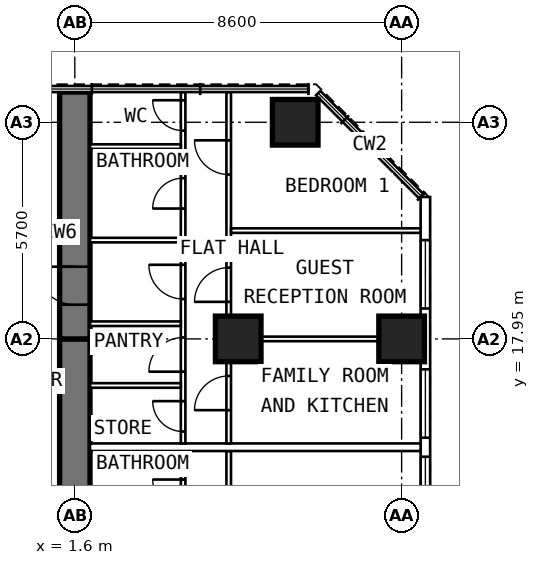
"""IFC4 building model, lengths in metres.
Left out: names, types, materials, properties, quantities, classifications, styles, units other than length and angle.
Written with IfcOpenShell. Run it as: python <this file> out.ifc"""

import sys

from ifc_helpers import new_model, si_unit, direction, frame, frame_2d, origin, origin_2d, place, context, subcontext, project, spatial, rectangle, extrude, element, fill, save


model = new_model("IFC4")
c1 = context("Model", 3, precision=1e-05, world=origin(), true_north=direction((0.0, 1.0)))
c2 = subcontext(c1, "Body", "Model", "MODEL_VIEW")
j1 = project(units=[si_unit("LENGTHUNIT", "METRE"), si_unit("PLANEANGLEUNIT", "RADIAN")], contexts=[c1])
p1 = place(None, origin())
s1 = spatial("IfcSite", under=j1, at=p1, CompositionType="ELEMENT")
p2 = place(p1, origin())
s2 = spatial("IfcBuilding", under=s1, at=p2, CompositionType="ELEMENT")
p3 = place(p2, frame((0.0, 0.0, 127.4)))
s3 = spatial("IfcBuildingStorey", under=s2, at=p3, CompositionType="ELEMENT", Elevation=127.4)
for number, where, z_axis, x_axis in (
    (1, (10.2, 17.95, 0.0), (0.0, 0.0, 1.0), (0.0, 1.0, 0.0)),
    (2, (7.4, 23.65, 0.0), (0.0, 0.0, 1.0), (0.0, 1.0, 0.0)),
    (3, (5.9, 17.95, 0.0), (0.0, 0.0, 1.0), (0.0, 1.0, 0.0)),
):
    element("IfcColumn", number, at=place(p3, frame(where, z_axis=z_axis, x_axis=x_axis)), inside=s3, PredefinedType="COLUMN", context=c2, shape_type="SweptSolid", body=[
        extrude(rectangle(XDim=1.2, YDim=1.2, at=origin_2d()), origin(), (0.0, 0.0, 1.0), 3.6),
    ])
p4 = place(p3, frame((1.6, 9.6, 0.0), z_axis=(0.0, 0.0, 1.0), x_axis=(0.0, 1.0, 0.0)))
e4 = element("IfcWall", 4, at=p4, inside=s3, PredefinedType="SHEAR", context=c2, shape_type="SweptSolid", body=[
    extrude(rectangle(XDim=8.35, YDim=0.8, at=frame_2d((4.175, 0.0))), origin(), (0.0, 0.0, 1.0), 3.6),
])
p5 = place(p4, frame((1.3, 0.0, 0.0)))
e5 = element("IfcOpeningElement", 5, at=p5, cuts=e4, PredefinedType="OPENING", context=c2, shape_type="SweptSolid", body=[
    extrude(rectangle(XDim=1.0, YDim=2.1, at=frame_2d((0.5, 1.05))), frame((0.0, 0.412, 0.0), z_axis=(0.0, -1.0, 0.0), x_axis=(1.0, 0.0, 0.0)), (0.0, 0.0, 1.0), 0.824),
])
p6 = place(p3, frame((1.6, 17.95, 0.0), z_axis=(0.0, 0.0, 1.0), x_axis=(0.0, 1.0, 0.0)))
e6 = element("IfcWall", 6, at=p6, inside=s3, PredefinedType="SHEAR", context=c2, shape_type="SweptSolid", body=[
    extrude(rectangle(XDim=6.495, YDim=0.8, at=frame_2d((3.248, 0.0))), origin(), (0.0, 0.0, 1.0), 3.6),
])
p7 = place(p6, frame((0.9, 0.0, 0.0)))
e7 = element("IfcOpeningElement", 7, at=p7, cuts=e6, PredefinedType="OPENING", context=c2, shape_type="SweptSolid", body=[
    extrude(rectangle(XDim=1.0, YDim=2.1, at=frame_2d((0.5, 1.05))), frame((0.0, 0.412, 0.0), z_axis=(0.0, -1.0, 0.0), x_axis=(1.0, 0.0, 0.0)), (0.0, 0.0, 1.0), 0.824),
])
p8 = place(p3, frame((10.825, 6.409, 0.0), z_axis=(0.0, 0.0, 1.0), x_axis=(0.0, 1.0, 0.0)))
e8 = element("IfcWall", 8, at=p8, inside=s3, PredefinedType="SOLIDWALL", context=c2, shape_type="SweptSolid", body=[
    extrude(rectangle(XDim=15.276, YDim=0.25, at=frame_2d((7.638, 0.0))), origin(), (0.0, 0.0, 1.0), 3.35),
])
p9 = place(p8, frame((0.941, 0.0, 0.8)))
e9 = element("IfcOpeningElement", 9, at=p9, cuts=e8, PredefinedType="OPENING", context=c2, shape_type="SweptSolid", body=[
    extrude(rectangle(XDim=1.8, YDim=1.8, at=frame_2d((0.9, 0.9))), frame((0.0, 0.137, 0.0), z_axis=(0.0, -1.0, 0.0), x_axis=(1.0, 0.0, 0.0)), (0.0, 0.0, 1.0), 0.274),
])
p10 = place(p8, frame((3.241, 0.0, 0.8)))
e10 = element("IfcOpeningElement", 10, at=p10, cuts=e8, PredefinedType="OPENING", context=c2, shape_type="SweptSolid", body=[
    extrude(rectangle(XDim=1.8, YDim=1.8, at=frame_2d((0.9, 0.9))), frame((0.0, 0.137, 0.0), z_axis=(0.0, -1.0, 0.0), x_axis=(1.0, 0.0, 0.0)), (0.0, 0.0, 1.0), 0.274),
])
p11 = place(p8, frame((6.641, 0.0, 0.8)))
e11 = element("IfcOpeningElement", 11, at=p11, cuts=e8, PredefinedType="OPENING", context=c2, shape_type="SweptSolid", body=[
    extrude(rectangle(XDim=1.8, YDim=1.8, at=frame_2d((0.9, 0.9))), frame((0.0, 0.137, 0.0), z_axis=(0.0, -1.0, 0.0), x_axis=(1.0, 0.0, 0.0)), (0.0, 0.0, 1.0), 0.274),
])
p12 = place(p8, frame((8.941, 0.0, 0.8)))
e12 = element("IfcOpeningElement", 12, at=p12, cuts=e8, PredefinedType="OPENING", context=c2, shape_type="SweptSolid", body=[
    extrude(rectangle(XDim=1.8, YDim=1.8, at=frame_2d((0.9, 0.9))), frame((0.0, 0.137, 0.0), z_axis=(0.0, -1.0, 0.0), x_axis=(1.0, 0.0, 0.0)), (0.0, 0.0, 1.0), 0.274),
])
p13 = place(p8, frame((12.341, 0.0, 0.8)))
e13 = element("IfcOpeningElement", 13, at=p13, cuts=e8, PredefinedType="OPENING", context=c2, shape_type="SweptSolid", body=[
    extrude(rectangle(XDim=1.8, YDim=1.8, at=frame_2d((0.9, 0.9))), frame((0.0, 0.137, 0.0), z_axis=(0.0, -1.0, 0.0), x_axis=(1.0, 0.0, 0.0)), (0.0, 0.0, 1.0), 0.274),
])
p14 = place(p3, frame((4.45, 10.05, 0.0), z_axis=(0.0, 0.0, 1.0), x_axis=(0.0, 1.0, 0.0)))
e14 = element("IfcWall", 14, at=p14, inside=s3, PredefinedType="PARTITIONING", context=c2, shape_type="SweptSolid", body=[
    extrude(rectangle(XDim=4.95, YDim=0.12, at=frame_2d((2.475, 0.0))), origin(), (0.0, 0.0, 1.0), 3.35),
])
p15 = place(p14, frame((0.8, 0.0, 0.0)))
e15 = element("IfcOpeningElement", 15, at=p15, cuts=e14, PredefinedType="OPENING", context=c2, shape_type="SweptSolid", body=[
    extrude(rectangle(XDim=0.9, YDim=2.1, at=frame_2d((0.45, 1.05))), frame((0.0, 0.072, 0.0), z_axis=(0.0, -1.0, 0.0), x_axis=(1.0, 0.0, 0.0)), (0.0, 0.0, 1.0), 0.144),
])
p16 = place(p14, frame((3.4, 0.0, 0.0)))
e16 = element("IfcOpeningElement", 16, at=p16, cuts=e14, PredefinedType="OPENING", context=c2, shape_type="SweptSolid", body=[
    extrude(rectangle(XDim=0.8, YDim=2.1, at=frame_2d((0.4, 1.05))), frame((0.0, 0.072, 0.0), z_axis=(0.0, -1.0, 0.0), x_axis=(1.0, 0.0, 0.0)), (0.0, 0.0, 1.0), 0.144),
])
p17 = place(p3, frame((5.65, 9.6, 0.0), z_axis=(0.0, 0.0, 1.0), x_axis=(0.0, 1.0, 0.0)))
e17 = element("IfcWall", 17, at=p17, inside=s3, PredefinedType="PARTITIONING", context=c2, shape_type="SweptSolid", body=[
    extrude(rectangle(XDim=5.4, YDim=0.12, at=frame_2d((2.7, 0.0))), origin(), (0.0, 0.0, 1.0), 3.35),
])
p18 = place(p17, frame((3.4, 0.0, 0.0)))
e18 = element("IfcOpeningElement", 18, at=p18, cuts=e17, PredefinedType="OPENING", context=c2, shape_type="SweptSolid", body=[
    extrude(rectangle(XDim=0.9, YDim=2.1, at=frame_2d((0.45, 1.05))), frame((0.0, 0.072, 0.0), z_axis=(0.0, -1.0, 0.0), x_axis=(1.0, 0.0, 0.0)), (0.0, 0.0, 1.0), 0.144),
])
p19 = place(p3, frame((4.45, 15.2, 0.0), z_axis=(0.0, 0.0, 1.0), x_axis=(0.0, 1.0, 0.0)))
e19 = element("IfcWall", 19, at=p19, inside=s3, PredefinedType="PARTITIONING", context=c2, shape_type="SweptSolid", body=[
    extrude(rectangle(XDim=9.245, YDim=0.12, at=frame_2d((4.623, 0.0))), origin(), (0.0, 0.0, 1.0), 3.35),
])
p20 = place(p19, frame((0.312, 0.0, 0.0)))
e20 = element("IfcOpeningElement", 20, at=p20, cuts=e19, PredefinedType="OPENING", context=c2, shape_type="SweptSolid", body=[
    extrude(rectangle(XDim=0.8, YDim=2.1, at=frame_2d((0.4, 1.05))), frame((0.0, 0.072, 0.0), z_axis=(0.0, -1.0, 0.0), x_axis=(1.0, 0.0, 0.0)), (0.0, 0.0, 1.0), 0.144),
])
p21 = place(p19, frame((1.887, 0.0, 0.0)))
e21 = element("IfcOpeningElement", 21, at=p21, cuts=e19, PredefinedType="OPENING", context=c2, shape_type="SweptSolid", body=[
    extrude(rectangle(XDim=0.9, YDim=2.1, at=frame_2d((0.45, 1.05))), frame((0.0, 0.072, 0.0), z_axis=(0.0, -1.0, 0.0), x_axis=(1.0, 0.0, 0.0)), (0.0, 0.0, 1.0), 0.144),
])
p22 = place(p19, frame((3.8, 0.0, 0.0)))
e22 = element("IfcOpeningElement", 22, at=p22, cuts=e19, PredefinedType="OPENING", context=c2, shape_type="SweptSolid", body=[
    extrude(rectangle(XDim=0.9, YDim=2.1, at=frame_2d((0.45, 1.05))), frame((0.0, 0.072, 0.0), z_axis=(0.0, -1.0, 0.0), x_axis=(1.0, 0.0, 0.0)), (0.0, 0.0, 1.0), 0.144),
])
p23 = place(p19, frame((6.18, 0.0, 0.0)))
e23 = element("IfcOpeningElement", 23, at=p23, cuts=e19, PredefinedType="OPENING", context=c2, shape_type="SweptSolid", body=[
    extrude(rectangle(XDim=0.8, YDim=2.1, at=frame_2d((0.4, 1.05))), frame((0.0, 0.072, 0.0), z_axis=(0.0, -1.0, 0.0), x_axis=(1.0, 0.0, 0.0)), (0.0, 0.0, 1.0), 0.144),
])
p24 = place(p19, frame((8.23, 0.0, 0.0)))
e24 = element("IfcOpeningElement", 24, at=p24, cuts=e19, PredefinedType="OPENING", context=c2, shape_type="SweptSolid", body=[
    extrude(rectangle(XDim=0.8, YDim=2.1, at=frame_2d((0.4, 1.05))), frame((0.0, 0.072, 0.0), z_axis=(0.0, -1.0, 0.0), x_axis=(1.0, 0.0, 0.0)), (0.0, 0.0, 1.0), 0.144),
])
p25 = place(p3, frame((5.65, 15.2, 0.0), z_axis=(0.0, 0.0, 1.0), x_axis=(0.0, 1.0, 0.0)))
e25 = element("IfcWall", 25, at=p25, inside=s3, PredefinedType="PARTITIONING", context=c2, shape_type="SweptSolid", body=[
    extrude(rectangle(XDim=9.245, YDim=0.12, at=frame_2d((4.623, 0.0))), origin(), (0.0, 0.0, 1.0), 3.35),
])
p26 = place(p25, frame((0.875, 0.0, 0.0)))
e26 = element("IfcOpeningElement", 26, at=p26, cuts=e25, PredefinedType="OPENING", context=c2, shape_type="SweptSolid", body=[
    extrude(rectangle(XDim=0.9, YDim=2.1, at=frame_2d((0.45, 1.05))), frame((0.0, 0.072, 0.0), z_axis=(0.0, -1.0, 0.0), x_axis=(1.0, 0.0, 0.0)), (0.0, 0.0, 1.0), 0.144),
])
p27 = place(p25, frame((3.725, 0.0, 0.0)))
e27 = element("IfcOpeningElement", 27, at=p27, cuts=e25, PredefinedType="OPENING", context=c2, shape_type="SweptSolid", body=[
    extrude(rectangle(XDim=0.9, YDim=2.1, at=frame_2d((0.45, 1.05))), frame((0.0, 0.072, 0.0), z_axis=(0.0, -1.0, 0.0), x_axis=(1.0, 0.0, 0.0)), (0.0, 0.0, 1.0), 0.144),
])
p28 = place(p25, frame((7.075, 0.0, 0.0)))
e28 = element("IfcOpeningElement", 28, at=p28, cuts=e25, PredefinedType="OPENING", context=c2, shape_type="SweptSolid", body=[
    extrude(rectangle(XDim=0.9, YDim=2.1, at=frame_2d((0.45, 1.05))), frame((0.0, 0.072, 0.0), z_axis=(0.0, -1.0, 0.0), x_axis=(1.0, 0.0, 0.0)), (0.0, 0.0, 1.0), 0.144),
])
p29 = place(p3, frame((5.71, 17.95, 0.0), z_axis=(0.0, 0.0, 1.0), x_axis=(1.0, 0.0, 0.0)))
e29 = element("IfcWall", 29, at=p29, inside=s3, PredefinedType="PARTITIONING", context=c2, shape_type="SweptSolid", body=[
    extrude(rectangle(XDim=4.99, YDim=0.12, at=frame_2d((2.495, 0.0))), origin(), (0.0, 0.0, 1.0), 2.45),
])
p30 = place(p3, frame((5.71, 20.8, 0.0), z_axis=(0.0, 0.0, 1.0), x_axis=(1.0, 0.0, 0.0)))
e30 = element("IfcWall", 30, at=p30, inside=s3, PredefinedType="PARTITIONING", context=c2, shape_type="SweptSolid", body=[
    extrude(rectangle(XDim=4.99, YDim=0.12, at=frame_2d((2.495, 0.0))), origin(), (0.0, 0.0, 1.0), 3.35),
])
for number, where, z_axis, x_axis in (
    (31, (2.0, 16.725, 0.0), (0.0, 0.0, 1.0), (1.0, 0.0, 0.0)),
    (32, (2.0, 18.35, 0.0), (0.0, 0.0, 1.0), (1.0, 0.0, 0.0)),
    (33, (2.0, 20.55, 0.0), (0.0, 0.0, 1.0), (1.0, 0.0, 0.0)),
    (34, (2.0, 23.01, 0.0), (0.0, 0.0, 1.0), (1.0, 0.0, 0.0)),
):
    element("IfcWall", number, at=place(p3, frame(where, z_axis=z_axis, x_axis=x_axis)), inside=s3, PredefinedType="PARTITIONING", context=c2, shape_type="SweptSolid", body=[
        extrude(rectangle(XDim=2.39, YDim=0.12, at=frame_2d((1.195, 0.0))), origin(), (0.0, 0.0, 1.0), 3.35),
    ])
p31 = place(p3, frame((2.0, 15.1, 0.0), z_axis=(0.0, 0.0, 1.0), x_axis=(1.0, 0.0, 0.0)))
e35 = element("IfcWall", 35, at=p31, inside=s3, PredefinedType="PARTITIONING", context=c2, shape_type="SweptSolid", body=[
    extrude(rectangle(XDim=8.7, YDim=0.2, at=frame_2d((4.35, 0.0))), origin(), (0.0, 0.0, 1.0), 3.35),
])
p32 = place(p3, frame((1.2, 20.75, 0.0), z_axis=(0.0, 0.0, 1.0), x_axis=(-1.0, 0.0, 0.0)))
e36 = element("IfcWall", 36, at=p32, inside=s3, PredefinedType="PARTITIONING", context=c2, shape_type="SweptSolid", body=[
    extrude(rectangle(XDim=2.4, YDim=0.15, at=frame_2d((1.2, 0.0))), origin(), (0.0, 0.0, 1.0), 3.35),
])
p33 = place(p32, frame((0.7, 0.0, 0.0)))
e37 = element("IfcOpeningElement", 37, at=p33, cuts=e36, PredefinedType="OPENING", context=c2, shape_type="SweptSolid", body=[
    extrude(rectangle(XDim=1.0, YDim=2.1, at=frame_2d((0.5, 1.05))), frame((0.0, 0.087, 0.0), z_axis=(0.0, -1.0, 0.0), x_axis=(1.0, 0.0, 0.0)), (0.0, 0.0, 1.0), 0.174),
])
p34 = place(p11, origin())
e38 = element("IfcWindow", 38, at=p34, inside=s3, PartitioningType="SINGLE_PANEL", PredefinedType="WINDOW", context=c2, shape_type="SweptSolid", body=[
    extrude(rectangle(XDim=1.8, YDim=1.8, at=frame_2d((0.9, 0.9))), frame((0.0, 0.03, 0.0), z_axis=(0.0, -1.0, 0.0), x_axis=(1.0, 0.0, 0.0)), (0.0, 0.0, 1.0), 0.06),
])
fill(e11, e38)
p35 = place(p12, origin())
e39 = element("IfcWindow", 39, at=p35, inside=s3, PartitioningType="SINGLE_PANEL", PredefinedType="WINDOW", context=c2, shape_type="SweptSolid", body=[
    extrude(rectangle(XDim=1.8, YDim=1.8, at=frame_2d((0.9, 0.9))), frame((0.0, 0.03, 0.0), z_axis=(0.0, -1.0, 0.0), x_axis=(1.0, 0.0, 0.0)), (0.0, 0.0, 1.0), 0.06),
])
fill(e12, e39)
p36 = place(p13, origin())
e40 = element("IfcWindow", 40, at=p36, inside=s3, PartitioningType="SINGLE_PANEL", PredefinedType="WINDOW", context=c2, shape_type="SweptSolid", body=[
    extrude(rectangle(XDim=1.8, YDim=1.8, at=frame_2d((0.9, 0.9))), frame((0.0, 0.03, 0.0), z_axis=(0.0, -1.0, 0.0), x_axis=(1.0, 0.0, 0.0)), (0.0, 0.0, 1.0), 0.06),
])
fill(e13, e40)
p37 = place(p16, origin())
e41 = element("IfcDoor", 41, at=p37, inside=s3, OperationType="SINGLE_SWING_RIGHT", PredefinedType="DOOR", context=c2, shape_type="SweptSolid", body=[
    extrude(rectangle(XDim=0.8, YDim=2.1, at=frame_2d((0.4, 1.05))), frame((0.0, 0.025, 0.0), z_axis=(0.0, -1.0, 0.0), x_axis=(1.0, 0.0, 0.0)), (0.0, 0.0, 1.0), 0.05),
])
fill(e16, e41)
p38 = place(p7, origin())
e42 = element("IfcDoor", 42, at=p38, inside=s3, OperationType="SINGLE_SWING_RIGHT", PredefinedType="DOOR", context=c2, shape_type="SweptSolid", body=[
    extrude(rectangle(XDim=1.0, YDim=2.1, at=frame_2d((0.5, 1.05))), frame((0.0, 0.15, 0.0), z_axis=(0.0, -1.0, 0.0), x_axis=(1.0, 0.0, 0.0)), (0.0, 0.0, 1.0), 0.3),
])
fill(e7, e42)
p39 = place(p26, origin())
e43 = element("IfcDoor", 43, at=p39, inside=s3, OperationType="SINGLE_SWING_LEFT", PredefinedType="DOOR", context=c2, shape_type="SweptSolid", body=[
    extrude(rectangle(XDim=0.9, YDim=2.1, at=frame_2d((0.45, 1.05))), frame((0.0, 0.025, 0.0), z_axis=(0.0, -1.0, 0.0), x_axis=(1.0, 0.0, 0.0)), (0.0, 0.0, 1.0), 0.05),
])
fill(e26, e43)
p40 = place(p27, origin())
e44 = element("IfcDoor", 44, at=p40, inside=s3, OperationType="SINGLE_SWING_LEFT", PredefinedType="DOOR", context=c2, shape_type="SweptSolid", body=[
    extrude(rectangle(XDim=0.9, YDim=2.1, at=frame_2d((0.45, 1.05))), frame((0.0, 0.025, 0.0), z_axis=(0.0, -1.0, 0.0), x_axis=(1.0, 0.0, 0.0)), (0.0, 0.0, 1.0), 0.05),
])
fill(e27, e44)
p41 = place(p28, origin())
e45 = element("IfcDoor", 45, at=p41, inside=s3, OperationType="SINGLE_SWING_RIGHT", PredefinedType="DOOR", context=c2, shape_type="SweptSolid", body=[
    extrude(rectangle(XDim=0.9, YDim=2.1, at=frame_2d((0.45, 1.05))), frame((0.0, 0.025, 0.0), z_axis=(0.0, -1.0, 0.0), x_axis=(1.0, 0.0, 0.0)), (0.0, 0.0, 1.0), 0.05),
])
fill(e28, e45)
p42 = place(p20, origin())
e46 = element("IfcDoor", 46, at=p42, inside=s3, OperationType="SINGLE_SWING_RIGHT", PredefinedType="DOOR", context=c2, shape_type="SweptSolid", body=[
    extrude(rectangle(XDim=0.8, YDim=2.1, at=frame_2d((0.4, 1.05))), frame((0.0, 0.025, 0.0), z_axis=(0.0, -1.0, 0.0), x_axis=(1.0, 0.0, 0.0)), (0.0, 0.0, 1.0), 0.05),
])
fill(e20, e46)
p43 = place(p21, origin())
e47 = element("IfcDoor", 47, at=p43, inside=s3, OperationType="SINGLE_SWING_LEFT", PredefinedType="DOOR", context=c2, shape_type="SweptSolid", body=[
    extrude(rectangle(XDim=0.9, YDim=2.1, at=frame_2d((0.45, 1.05))), frame((0.0, 0.025, 0.0), z_axis=(0.0, -1.0, 0.0), x_axis=(1.0, 0.0, 0.0)), (0.0, 0.0, 1.0), 0.05),
])
fill(e21, e47)
p44 = place(p22, origin())
e48 = element("IfcDoor", 48, at=p44, inside=s3, OperationType="SINGLE_SWING_RIGHT", PredefinedType="DOOR", context=c2, shape_type="SweptSolid", body=[
    extrude(rectangle(XDim=0.9, YDim=2.1, at=frame_2d((0.45, 1.05))), frame((0.0, 0.025, 0.0), z_axis=(0.0, -1.0, 0.0), x_axis=(1.0, 0.0, 0.0)), (0.0, 0.0, 1.0), 0.05),
])
fill(e22, e48)
p45 = place(p23, origin())
e49 = element("IfcDoor", 49, at=p45, inside=s3, OperationType="SINGLE_SWING_LEFT", PredefinedType="DOOR", context=c2, shape_type="SweptSolid", body=[
    extrude(rectangle(XDim=0.8, YDim=2.1, at=frame_2d((0.4, 1.05))), frame((0.0, 0.025, 0.0), z_axis=(0.0, -1.0, 0.0), x_axis=(1.0, 0.0, 0.0)), (0.0, 0.0, 1.0), 0.05),
])
fill(e23, e49)
p46 = place(p24, origin())
e50 = element("IfcDoor", 50, at=p46, inside=s3, OperationType="SINGLE_SWING_RIGHT", PredefinedType="DOOR", context=c2, shape_type="SweptSolid", body=[
    extrude(rectangle(XDim=0.8, YDim=2.1, at=frame_2d((0.4, 1.05))), frame((0.0, 0.025, 0.0), z_axis=(0.0, -1.0, 0.0), x_axis=(1.0, 0.0, 0.0)), (0.0, 0.0, 1.0), 0.05),
])
fill(e24, e50)
save(model, sys.argv[1])
